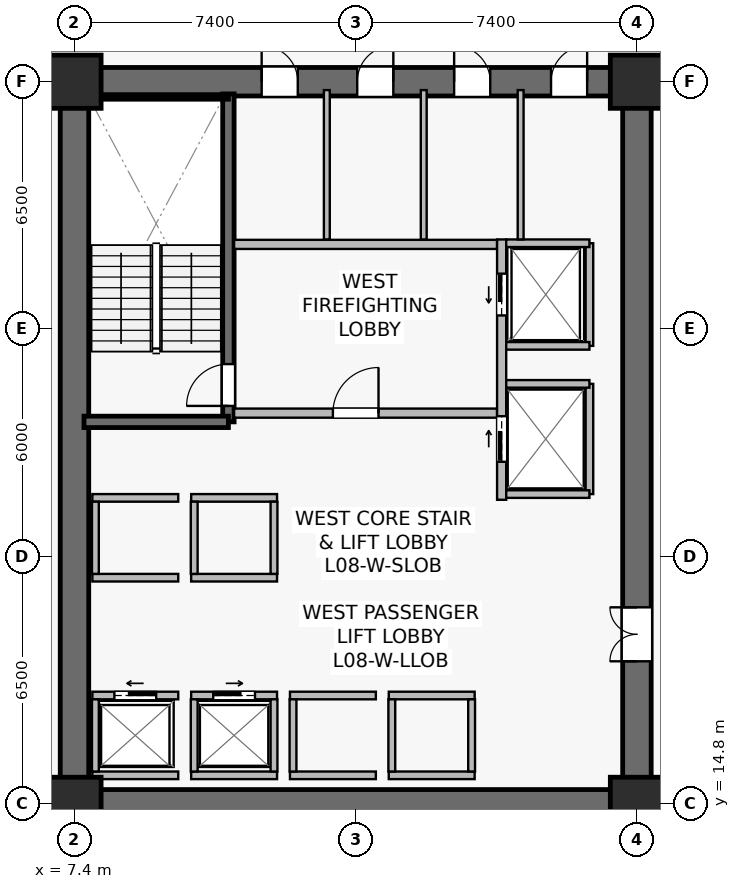
"""IFC4 building model, lengths in metres.
Left out: names, types, materials, properties, quantities, classifications, styles, units other than length and angle.
Written with IfcOpenShell. Run it as: python <this file> out.ifc"""

import sys

from ifc_helpers import new_model, si_unit, direction, frame, frame_2d, origin, origin_2d, place, context, subcontext, project, spatial, rectangle, extrude, source, transform, mapped, element, fill, save


model = new_model("IFC4")
c1 = context("Model", 3, precision=1e-05, world=origin(), true_north=direction((0.0, 1.0)))
c2 = subcontext(c1, "Body", "Model", "MODEL_VIEW")
j1 = project(units=[si_unit("LENGTHUNIT", "METRE"), si_unit("PLANEANGLEUNIT", "RADIAN")], contexts=[c1])
p1 = place(None, origin())
s1 = spatial("IfcSite", under=j1, at=p1, CompositionType="ELEMENT")
p2 = place(p1, origin())
s2 = spatial("IfcBuilding", under=s1, at=p2, CompositionType="ELEMENT")
p3 = place(p2, frame((0.0, 0.0, 33.4)))
s3 = spatial("IfcBuildingStorey", under=s2, at=p3, CompositionType="ELEMENT", Elevation=33.4)
p4 = place(p3, frame((7.025, 14.8, 0.0), z_axis=(0.0, 0.0, 1.0), x_axis=(1.0, 0.0, 0.0)))
e1 = element("IfcWall", 1, at=p4, inside=s3, PredefinedType="SHEAR", context=c2, shape_type="SweptSolid", body=[
    extrude(rectangle(XDim=15.55, YDim=0.75, at=frame_2d((7.775, 0.0))), origin(), (0.0, 0.0, 1.0), 3.78),
])
p5 = place(p3, frame((7.025, 33.8, 0.0), z_axis=(0.0, 0.0, 1.0), x_axis=(1.0, 0.0, 0.0)))
e2 = element("IfcWall", 2, at=p5, inside=s3, PredefinedType="SHEAR", context=c2, shape_type="SweptSolid", body=[
    extrude(rectangle(XDim=15.55, YDim=0.75, at=frame_2d((7.775, 0.0))), origin(), (0.0, 0.0, 1.0), 3.78),
])
p6 = place(p5, frame((5.3, 0.0, 0.0)))
e3 = element("IfcOpeningElement", 3, at=p6, cuts=e2, PredefinedType="OPENING", context=c2, shape_type="SweptSolid", body=[
    extrude(rectangle(XDim=0.95, YDim=2.15, at=frame_2d((0.475, 1.075))), frame((0.0, 0.385, 0.0), z_axis=(0.0, -1.0, 0.0), x_axis=(1.0, 0.0, 0.0)), (0.0, 0.0, 1.0), 0.77),
])
p7 = place(p5, frame((7.815, 0.0, 0.0)))
e4 = element("IfcOpeningElement", 4, at=p7, cuts=e2, PredefinedType="OPENING", context=c2, shape_type="SweptSolid", body=[
    extrude(rectangle(XDim=0.95, YDim=2.15, at=frame_2d((0.475, 1.075))), frame((0.0, 0.385, 0.0), z_axis=(0.0, -1.0, 0.0), x_axis=(1.0, 0.0, 0.0)), (0.0, 0.0, 1.0), 0.77),
])
p8 = place(p5, frame((10.365, 0.0, 0.0)))
e5 = element("IfcOpeningElement", 5, at=p8, cuts=e2, PredefinedType="OPENING", context=c2, shape_type="SweptSolid", body=[
    extrude(rectangle(XDim=0.95, YDim=2.15, at=frame_2d((0.475, 1.075))), frame((0.0, 0.385, 0.0), z_axis=(0.0, -1.0, 0.0), x_axis=(1.0, 0.0, 0.0)), (0.0, 0.0, 1.0), 0.77),
])
p9 = place(p5, frame((12.915, 0.0, 0.0)))
e6 = element("IfcOpeningElement", 6, at=p9, cuts=e2, PredefinedType="OPENING", context=c2, shape_type="SweptSolid", body=[
    extrude(rectangle(XDim=0.95, YDim=2.15, at=frame_2d((0.475, 1.075))), frame((0.0, 0.385, 0.0), z_axis=(0.0, -1.0, 0.0), x_axis=(1.0, 0.0, 0.0)), (0.0, 0.0, 1.0), 0.77),
])
p10 = place(p3, frame((7.4, 15.175, 0.0), z_axis=(0.0, 0.0, 1.0), x_axis=(0.0, 1.0, 0.0)))
e7 = element("IfcWall", 7, at=p10, inside=s3, PredefinedType="SHEAR", context=c2, shape_type="SweptSolid", body=[
    extrude(rectangle(XDim=18.25, YDim=0.75, at=frame_2d((9.125, 0.0))), origin(), (0.0, 0.0, 1.0), 3.78),
])
p11 = place(p3, frame((22.2, 15.175, 0.0), z_axis=(0.0, 0.0, 1.0), x_axis=(0.0, 1.0, 0.0)))
e8 = element("IfcWall", 8, at=p11, inside=s3, PredefinedType="SHEAR", context=c2, shape_type="SweptSolid", body=[
    extrude(rectangle(XDim=18.25, YDim=0.75, at=frame_2d((9.125, 0.0))), origin(), (0.0, 0.0, 1.0), 3.78),
])
p12 = place(p11, frame((3.375, 0.0, 0.0)))
e9 = element("IfcOpeningElement", 9, at=p12, cuts=e8, PredefinedType="OPENING", context=c2, shape_type="SweptSolid", body=[
    extrude(rectangle(XDim=1.42, YDim=2.2, at=frame_2d((0.71, 1.1))), frame((0.0, 0.385, 0.0), z_axis=(0.0, -1.0, 0.0), x_axis=(1.0, 0.0, 0.0)), (0.0, 0.0, 1.0), 0.77),
])
p13 = place(p3, frame((11.45, 24.85, 0.0), z_axis=(0.0, 0.0, 1.0), x_axis=(0.0, 1.0, 0.0)))
e10 = element("IfcWall", 10, at=p13, inside=s3, PredefinedType="SHEAR", context=c2, shape_type="SweptSolid", body=[
    extrude(rectangle(XDim=8.63, YDim=0.3, at=frame_2d((4.315, 0.0))), origin(), (0.0, 0.0, 1.0), 3.78),
])
p14 = place(p13, frame((0.42, 0.0, 0.0)))
e11 = element("IfcOpeningElement", 11, at=p14, cuts=e10, PredefinedType="OPENING", context=c2, shape_type="SweptSolid", body=[
    extrude(rectangle(XDim=1.1, YDim=2.15, at=frame_2d((0.55, 1.075))), frame((0.0, 0.16, 0.0), z_axis=(0.0, -1.0, 0.0), x_axis=(1.0, 0.0, 0.0)), (0.0, 0.0, 1.0), 0.32),
])
p15 = place(p3, frame((7.65, 24.85, 0.0), z_axis=(0.0, 0.0, 1.0), x_axis=(1.0, 0.0, 0.0)))
e12 = element("IfcWall", 12, at=p15, inside=s3, PredefinedType="SHEAR", context=c2, shape_type="SweptSolid", body=[
    extrude(rectangle(XDim=3.8, YDim=0.3, at=frame_2d((1.9, 0.0))), origin(), (0.0, 0.0, 1.0), 3.78),
])
p16 = place(p3, frame((7.73, 33.4, 0.0), z_axis=(0.0, 0.0, 1.0), x_axis=(1.0, 0.0, 0.0)))
e13 = element("IfcWall", 13, at=p16, inside=s3, PredefinedType="SOLIDWALL", context=c2, shape_type="SweptSolid", body=[
    extrude(rectangle(XDim=3.72, YDim=0.12, at=frame_2d((1.86, 0.0))), origin(), (0.0, 0.0, 1.0), 3.78),
])
m1 = source(origin(), c2, "Body", "SweptSolid", [
    extrude(rectangle(XDim=1.4, YDim=1.4, at=origin_2d()), origin(), (0.0, 0.0, 1.0), 4.1),
])
for number, where, z_axis, x_axis in (
    (14, (7.4, 14.8, 0.0), (0.0, 0.0, 1.0), (1.0, 0.0, 0.0)),
    (15, (22.2, 14.8, 0.0), (0.0, 0.0, 1.0), (1.0, 0.0, 0.0)),
    (16, (7.4, 33.8, 0.0), (0.0, 0.0, 1.0), (1.0, 0.0, 0.0)),
    (17, (22.2, 33.8, 0.0), (0.0, 0.0, 1.0), (1.0, 0.0, 0.0)),
):
    element("IfcColumn", number, at=place(p3, frame(where, z_axis=z_axis, x_axis=x_axis)), inside=s3, PredefinedType="COLUMN", context=c2, shape_type="MappedRepresentation", body=[
        mapped(m1, transform((0.0, 0.0, 0.0), scale=1.0)),
    ])
p17 = place(p3, frame((11.6, 25.08, 0.0), z_axis=(0.0, 0.0, 1.0), x_axis=(1.0, 0.0, 0.0)))
e18 = element("IfcWall", 18, at=p17, inside=s3, PredefinedType="SOLIDWALL", context=c2, shape_type="SweptSolid", body=[
    extrude(rectangle(XDim=6.92, YDim=0.24, at=frame_2d((3.46, 0.0))), origin(), (0.0, 0.0, 1.0), 3.065),
])
p18 = place(p17, frame((2.6, 0.0, 0.0)))
e19 = element("IfcOpeningElement", 19, at=p18, cuts=e18, PredefinedType="OPENING", context=c2, shape_type="SweptSolid", body=[
    extrude(rectangle(XDim=1.2, YDim=2.16, at=frame_2d((0.6, 1.08))), frame((0.0, 0.13, 0.0), z_axis=(0.0, -1.0, 0.0), x_axis=(1.0, 0.0, 0.0)), (0.0, 0.0, 1.0), 0.26),
])
p19 = place(p3, frame((11.6, 29.52, 0.0), z_axis=(0.0, 0.0, 1.0), x_axis=(1.0, 0.0, 0.0)))
e20 = element("IfcWall", 20, at=p19, inside=s3, PredefinedType="SOLIDWALL", context=c2, shape_type="SweptSolid", body=[
    extrude(rectangle(XDim=6.92, YDim=0.24, at=frame_2d((3.46, 0.0))), origin(), (0.0, 0.0, 1.0), 3.065),
])
p20 = place(p3, frame((18.64, 22.8, 0.0), z_axis=(0.0, 0.0, 1.0), x_axis=(0.0, 1.0, 0.0)))
e21 = element("IfcWall", 21, at=p20, inside=s3, PredefinedType="SOLIDWALL", context=c2, shape_type="SweptSolid", body=[
    extrude(rectangle(XDim=6.85, YDim=0.24, at=frame_2d((3.425, 0.0))), origin(), (0.0, 0.0, 1.0), 2.865),
])
p21 = place(p20, frame((4.85, 0.0, 0.0)))
e22 = element("IfcOpeningElement", 22, at=p21, cuts=e21, PredefinedType="OPENING", context=c2, shape_type="SweptSolid", body=[
    extrude(rectangle(XDim=1.1, YDim=2.22, at=frame_2d((0.55, 1.11))), frame((0.0, 0.13, 0.0), z_axis=(0.0, -1.0, 0.0), x_axis=(1.0, 0.0, 0.0)), (0.0, 0.0, 1.0), 0.26),
])
p22 = place(p20, frame((1.0, 0.0, 0.0)))
e23 = element("IfcOpeningElement", 23, at=p22, cuts=e21, PredefinedType="OPENING", context=c2, shape_type="SweptSolid", body=[
    extrude(rectangle(XDim=1.2, YDim=2.22, at=frame_2d((0.6, 1.11))), frame((0.0, 0.13, 0.0), z_axis=(0.0, -1.0, 0.0), x_axis=(1.0, 0.0, 0.0)), (0.0, 0.0, 1.0), 0.26),
])
p23 = place(p3, frame((7.87, 17.65, 0.0), z_axis=(0.0, 0.0, 1.0), x_axis=(1.0, 0.0, 0.0)))
e24 = element("IfcWall", 24, at=p23, inside=s3, PredefinedType="SOLIDWALL", context=c2, shape_type="SweptSolid", body=[
    extrude(rectangle(XDim=2.26, YDim=0.2, at=frame_2d((1.13, 0.0))), origin(), (0.0, 0.0, 1.0), 3.78),
])
p24 = place(p23, frame((0.58, 0.0, 0.0)))
e25 = element("IfcOpeningElement", 25, at=p24, cuts=e24, PredefinedType="OPENING", context=c2, shape_type="SweptSolid", body=[
    extrude(rectangle(XDim=1.1, YDim=2.22, at=frame_2d((0.55, 1.11))), frame((0.0, 0.11, 0.0), z_axis=(0.0, -1.0, 0.0), x_axis=(1.0, 0.0, 0.0)), (0.0, 0.0, 1.0), 0.22),
])
p25 = place(p3, frame((7.87, 15.55, 0.0), z_axis=(0.0, 0.0, 1.0), x_axis=(1.0, 0.0, 0.0)))
e26 = element("IfcWall", 26, at=p25, inside=s3, PredefinedType="SOLIDWALL", context=c2, shape_type="SweptSolid", body=[
    extrude(rectangle(XDim=2.26, YDim=0.2, at=frame_2d((1.13, 0.0))), origin(), (0.0, 0.0, 1.0), 3.78),
])
p26 = place(p3, frame((7.95, 15.65, 0.0), z_axis=(0.0, 0.0, 1.0), x_axis=(0.0, 1.0, 0.0)))
e27 = element("IfcWall", 27, at=p26, inside=s3, PredefinedType="SOLIDWALL", context=c2, shape_type="SweptSolid", body=[
    extrude(rectangle(XDim=1.9, YDim=0.18, at=frame_2d((0.95, 0.0))), origin(), (0.0, 0.0, 1.0), 3.78),
])
p27 = place(p3, frame((10.47, 17.65, 0.0), z_axis=(0.0, 0.0, 1.0), x_axis=(1.0, 0.0, 0.0)))
e28 = element("IfcWall", 28, at=p27, inside=s3, PredefinedType="SOLIDWALL", context=c2, shape_type="SweptSolid", body=[
    extrude(rectangle(XDim=2.26, YDim=0.2, at=frame_2d((1.13, 0.0))), origin(), (0.0, 0.0, 1.0), 3.78),
])
p28 = place(p27, frame((0.58, 0.0, 0.0)))
e29 = element("IfcOpeningElement", 29, at=p28, cuts=e28, PredefinedType="OPENING", context=c2, shape_type="SweptSolid", body=[
    extrude(rectangle(XDim=1.1, YDim=2.22, at=frame_2d((0.55, 1.11))), frame((0.0, 0.11, 0.0), z_axis=(0.0, -1.0, 0.0), x_axis=(1.0, 0.0, 0.0)), (0.0, 0.0, 1.0), 0.22),
])
p29 = place(p3, frame((10.47, 15.55, 0.0), z_axis=(0.0, 0.0, 1.0), x_axis=(1.0, 0.0, 0.0)))
e30 = element("IfcWall", 30, at=p29, inside=s3, PredefinedType="SOLIDWALL", context=c2, shape_type="SweptSolid", body=[
    extrude(rectangle(XDim=2.26, YDim=0.2, at=frame_2d((1.13, 0.0))), origin(), (0.0, 0.0, 1.0), 3.78),
])
for number, where, z_axis, x_axis in (
    (31, (10.55, 15.65, 0.0), (0.0, 0.0, 1.0), (0.0, 1.0, 0.0)),
    (32, (12.65, 15.65, 0.0), (0.0, 0.0, 1.0), (0.0, 1.0, 0.0)),
):
    element("IfcWall", number, at=place(p3, frame(where, z_axis=z_axis, x_axis=x_axis)), inside=s3, PredefinedType="SOLIDWALL", context=c2, shape_type="SweptSolid", body=[
        extrude(rectangle(XDim=1.9, YDim=0.18, at=frame_2d((0.95, 0.0))), origin(), (0.0, 0.0, 1.0), 3.78),
    ])
for number, where, z_axis, x_axis in (
    (33, (13.07, 17.65, 0.0), (0.0, 0.0, 1.0), (1.0, 0.0, 0.0)),
    (34, (13.07, 15.55, 0.0), (0.0, 0.0, 1.0), (1.0, 0.0, 0.0)),
):
    element("IfcWall", number, at=place(p3, frame(where, z_axis=z_axis, x_axis=x_axis)), inside=s3, PredefinedType="SOLIDWALL", context=c2, shape_type="SweptSolid", body=[
        extrude(rectangle(XDim=2.26, YDim=0.2, at=frame_2d((1.13, 0.0))), origin(), (0.0, 0.0, 1.0), 3.065),
    ])
p30 = place(p3, frame((13.15, 15.65, 0.0), z_axis=(0.0, 0.0, 1.0), x_axis=(0.0, 1.0, 0.0)))
e35 = element("IfcWall", 35, at=p30, inside=s3, PredefinedType="SOLIDWALL", context=c2, shape_type="SweptSolid", body=[
    extrude(rectangle(XDim=1.9, YDim=0.18, at=frame_2d((0.95, 0.0))), origin(), (0.0, 0.0, 1.0), 3.78),
])
for number, where, z_axis, x_axis in (
    (36, (15.67, 17.65, 0.0), (0.0, 0.0, 1.0), (1.0, 0.0, 0.0)),
    (37, (15.67, 15.55, 0.0), (0.0, 0.0, 1.0), (1.0, 0.0, 0.0)),
):
    element("IfcWall", number, at=place(p3, frame(where, z_axis=z_axis, x_axis=x_axis)), inside=s3, PredefinedType="SOLIDWALL", context=c2, shape_type="SweptSolid", body=[
        extrude(rectangle(XDim=2.26, YDim=0.2, at=frame_2d((1.13, 0.0))), origin(), (0.0, 0.0, 1.0), 3.78),
    ])
for number, where, z_axis, x_axis in (
    (38, (15.75, 15.65, 0.0), (0.0, 0.0, 1.0), (0.0, 1.0, 0.0)),
    (39, (17.85, 15.65, 0.0), (0.0, 0.0, 1.0), (0.0, 1.0, 0.0)),
):
    element("IfcWall", number, at=place(p3, frame(where, z_axis=z_axis, x_axis=x_axis)), inside=s3, PredefinedType="SOLIDWALL", context=c2, shape_type="SweptSolid", body=[
        extrude(rectangle(XDim=1.9, YDim=0.18, at=frame_2d((0.95, 0.0))), origin(), (0.0, 0.0, 1.0), 3.78),
    ])
for number, where, z_axis, x_axis in (
    (40, (7.87, 20.75, 0.0), (0.0, 0.0, 1.0), (1.0, 0.0, 0.0)),
    (41, (7.87, 22.85, 0.0), (0.0, 0.0, 1.0), (1.0, 0.0, 0.0)),
):
    element("IfcWall", number, at=place(p3, frame(where, z_axis=z_axis, x_axis=x_axis)), inside=s3, PredefinedType="SOLIDWALL", context=c2, shape_type="SweptSolid", body=[
        extrude(rectangle(XDim=2.26, YDim=0.2, at=frame_2d((1.13, 0.0))), origin(), (0.0, 0.0, 1.0), 3.78),
    ])
p31 = place(p3, frame((7.95, 20.85, 0.0), z_axis=(0.0, 0.0, 1.0), x_axis=(0.0, 1.0, 0.0)))
e42 = element("IfcWall", 42, at=p31, inside=s3, PredefinedType="SOLIDWALL", context=c2, shape_type="SweptSolid", body=[
    extrude(rectangle(XDim=1.9, YDim=0.18, at=frame_2d((0.95, 0.0))), origin(), (0.0, 0.0, 1.0), 3.78),
])
for number, where, z_axis, x_axis in (
    (43, (10.47, 20.75, 0.0), (0.0, 0.0, 1.0), (1.0, 0.0, 0.0)),
    (44, (10.47, 22.85, 0.0), (0.0, 0.0, 1.0), (1.0, 0.0, 0.0)),
):
    element("IfcWall", number, at=place(p3, frame(where, z_axis=z_axis, x_axis=x_axis)), inside=s3, PredefinedType="SOLIDWALL", context=c2, shape_type="SweptSolid", body=[
        extrude(rectangle(XDim=2.26, YDim=0.2, at=frame_2d((1.13, 0.0))), origin(), (0.0, 0.0, 1.0), 3.78),
    ])
for number, where, z_axis, x_axis in (
    (45, (10.55, 20.85, 0.0), (0.0, 0.0, 1.0), (0.0, 1.0, 0.0)),
    (46, (12.65, 20.85, 0.0), (0.0, 0.0, 1.0), (0.0, 1.0, 0.0)),
):
    element("IfcWall", number, at=place(p3, frame(where, z_axis=z_axis, x_axis=x_axis)), inside=s3, PredefinedType="SOLIDWALL", context=c2, shape_type="SweptSolid", body=[
        extrude(rectangle(XDim=1.9, YDim=0.18, at=frame_2d((0.95, 0.0))), origin(), (0.0, 0.0, 1.0), 3.78),
    ])
p32 = place(p3, frame((20.95, 26.85, 0.0), z_axis=(0.0, 0.0, 1.0), x_axis=(0.0, 1.0, 0.0)))
e47 = element("IfcWall", 47, at=p32, inside=s3, PredefinedType="SOLIDWALL", context=c2, shape_type="SweptSolid", body=[
    extrude(rectangle(XDim=2.7, YDim=0.2, at=frame_2d((1.35, 0.0))), origin(), (0.0, 0.0, 1.0), 3.78),
])
p33 = place(p3, frame((18.76, 29.55, 0.0), z_axis=(0.0, 0.0, 1.0), x_axis=(1.0, 0.0, 0.0)))
e48 = element("IfcWall", 48, at=p33, inside=s3, PredefinedType="SOLIDWALL", context=c2, shape_type="SweptSolid", body=[
    extrude(rectangle(XDim=2.19, YDim=0.2, at=frame_2d((1.095, 0.0))), origin(), (0.0, 0.0, 1.0), 3.78),
])
p34 = place(p3, frame((18.76, 26.85, 0.0), z_axis=(0.0, 0.0, 1.0), x_axis=(1.0, 0.0, 0.0)))
e49 = element("IfcWall", 49, at=p34, inside=s3, PredefinedType="SOLIDWALL", context=c2, shape_type="SweptSolid", body=[
    extrude(rectangle(XDim=2.19, YDim=0.2, at=frame_2d((1.095, 0.0))), origin(), (0.0, 0.0, 1.0), 3.177),
])
p35 = place(p3, frame((20.95, 22.95, 0.0), z_axis=(0.0, 0.0, 1.0), x_axis=(0.0, 1.0, 0.0)))
e50 = element("IfcWall", 50, at=p35, inside=s3, PredefinedType="SOLIDWALL", context=c2, shape_type="SweptSolid", body=[
    extrude(rectangle(XDim=2.9, YDim=0.2, at=frame_2d((1.45, 0.0))), origin(), (0.0, 0.0, 1.0), 2.865),
])
for number, where, z_axis, x_axis in (
    (51, (18.76, 25.85, 0.0), (0.0, 0.0, 1.0), (1.0, 0.0, 0.0)),
    (52, (18.76, 22.95, 0.0), (0.0, 0.0, 1.0), (1.0, 0.0, 0.0)),
):
    element("IfcWall", number, at=place(p3, frame(where, z_axis=z_axis, x_axis=x_axis)), inside=s3, PredefinedType="SOLIDWALL", context=c2, shape_type="SweptSolid", body=[
        extrude(rectangle(XDim=2.19, YDim=0.2, at=frame_2d((1.095, 0.0))), origin(), (0.0, 0.0, 1.0), 3.78),
    ])
for number, where, z_axis, x_axis in (
    (53, (14.04, 29.65, 0.0), (0.0, 0.0, 1.0), (0.0, 1.0, 0.0)),
    (54, (16.59, 29.65, 0.0), (0.0, 0.0, 1.0), (0.0, 1.0, 0.0)),
    (55, (19.14, 29.65, 0.0), (0.0, 0.0, 1.0), (0.0, 1.0, 0.0)),
):
    element("IfcWall", number, at=place(p3, frame(where, z_axis=z_axis, x_axis=x_axis)), inside=s3, PredefinedType="PLUMBINGWALL", context=c2, shape_type="SweptSolid", body=[
        extrude(rectangle(XDim=3.93, YDim=0.155, at=frame_2d((1.965, 0.0))), origin(), (0.0, 0.0, 1.0), 3.78),
    ])
m2 = source(origin(), c2, "Body", "SweptSolid", [
    extrude(rectangle(XDim=1.1, YDim=2.15, at=frame_2d((0.55, 1.075))), frame((0.0, 0.025, 0.0), z_axis=(0.0, -1.0, 0.0), x_axis=(1.0, 0.0, 0.0)), (0.0, 0.0, 1.0), 0.05),
])
p36 = place(p14, origin())
e56 = element("IfcDoor", 56, at=p36, inside=s3, OperationType="SINGLE_SWING_LEFT", PredefinedType="DOOR", context=c2, shape_type="MappedRepresentation", body=[
    mapped(m2, transform((0.0, 0.0, 0.0), scale=1.0)),
])
fill(e11, e56)
m3 = source(origin(), c2, "Body", "SweptSolid", [
    extrude(rectangle(XDim=1.2, YDim=2.16, at=frame_2d((0.6, 1.08))), frame((0.0, 0.025, 0.0), z_axis=(0.0, -1.0, 0.0), x_axis=(1.0, 0.0, 0.0)), (0.0, 0.0, 1.0), 0.05),
])
p37 = place(p18, origin())
e57 = element("IfcDoor", 57, at=p37, inside=s3, OperationType="SINGLE_SWING_RIGHT", PredefinedType="DOOR", context=c2, shape_type="MappedRepresentation", body=[
    mapped(m3, transform((0.0, 0.0, 0.0), scale=1.0)),
])
fill(e19, e57)
m4 = source(origin(), c2, "Body", "SweptSolid", [
    extrude(rectangle(XDim=1.1, YDim=2.22, at=frame_2d((0.55, 1.11))), frame((0.0, 0.025, 0.0), z_axis=(0.0, -1.0, 0.0), x_axis=(1.0, 0.0, 0.0)), (0.0, 0.0, 1.0), 0.05),
])
p38 = place(p24, origin())
e58 = element("IfcDoor", 58, at=p38, inside=s3, OperationType="SLIDING_TO_LEFT", PredefinedType="USERDEFINED", context=c2, shape_type="MappedRepresentation", body=[
    mapped(m4, transform((0.0, 0.0, 0.0), scale=1.0)),
])
fill(e25, e58)
p39 = place(p28, origin())
e59 = element("IfcDoor", 59, at=p39, inside=s3, OperationType="SLIDING_TO_RIGHT", PredefinedType="USERDEFINED", context=c2, shape_type="MappedRepresentation", body=[
    mapped(m4, transform((0.0, 0.0, 0.0), scale=1.0)),
])
fill(e29, e59)
p40 = place(p21, origin())
e60 = element("IfcDoor", 60, at=p40, inside=s3, OperationType="SLIDING_TO_LEFT", PredefinedType="USERDEFINED", context=c2, shape_type="MappedRepresentation", body=[
    mapped(m4, transform((0.0, 0.0, 0.0), scale=1.0)),
])
fill(e22, e60)
m5 = source(origin(), c2, "Body", "SweptSolid", [
    extrude(rectangle(XDim=1.2, YDim=2.22, at=frame_2d((0.6, 1.11))), frame((0.0, 0.025, 0.0), z_axis=(0.0, -1.0, 0.0), x_axis=(1.0, 0.0, 0.0)), (0.0, 0.0, 1.0), 0.05),
])
p41 = place(p22, origin())
e61 = element("IfcDoor", 61, at=p41, inside=s3, OperationType="SLIDING_TO_RIGHT", PredefinedType="USERDEFINED", context=c2, shape_type="MappedRepresentation", body=[
    mapped(m5, transform((0.0, 0.0, 0.0), scale=1.0)),
])
fill(e23, e61)
m6 = source(origin(), c2, "Body", "SweptSolid", [
    extrude(rectangle(XDim=1.42, YDim=2.2, at=frame_2d((0.71, 1.1))), frame((0.0, 0.025, 0.0), z_axis=(0.0, -1.0, 0.0), x_axis=(1.0, 0.0, 0.0)), (0.0, 0.0, 1.0), 0.05),
])
p42 = place(p12, origin())
e62 = element("IfcDoor", 62, at=p42, inside=s3, OperationType="DOUBLE_DOOR_SINGLE_SWING", PredefinedType="DOOR", context=c2, shape_type="MappedRepresentation", body=[
    mapped(m6, transform((0.0, 0.0, 0.0), scale=1.0)),
])
fill(e9, e62)
m7 = source(origin(), c2, "Body", "SweptSolid", [
    extrude(rectangle(XDim=0.95, YDim=2.15, at=frame_2d((0.475, 1.075))), frame((0.0, 0.025, 0.0), z_axis=(0.0, -1.0, 0.0), x_axis=(1.0, 0.0, 0.0)), (0.0, 0.0, 1.0), 0.05),
])
p43 = place(p6, origin())
e63 = element("IfcDoor", 63, at=p43, inside=s3, OperationType="SINGLE_SWING_LEFT", PredefinedType="DOOR", context=c2, shape_type="MappedRepresentation", body=[
    mapped(m7, transform((0.0, 0.0, 0.0), scale=1.0)),
])
fill(e3, e63)
p44 = place(p7, origin())
e64 = element("IfcDoor", 64, at=p44, inside=s3, OperationType="SINGLE_SWING_RIGHT", PredefinedType="DOOR", context=c2, shape_type="MappedRepresentation", body=[
    mapped(m7, transform((0.0, 0.0, 0.0), scale=1.0)),
])
fill(e4, e64)
p45 = place(p8, origin())
e65 = element("IfcDoor", 65, at=p45, inside=s3, OperationType="SINGLE_SWING_LEFT", PredefinedType="DOOR", context=c2, shape_type="MappedRepresentation", body=[
    mapped(m7, transform((0.0, 0.0, 0.0), scale=1.0)),
])
fill(e5, e65)
p46 = place(p9, origin())
e66 = element("IfcDoor", 66, at=p46, inside=s3, OperationType="SINGLE_SWING_RIGHT", PredefinedType="DOOR", context=c2, shape_type="MappedRepresentation", body=[
    mapped(m7, transform((0.0, 0.0, 0.0), scale=1.0)),
])
fill(e6, e66)
save(model, sys.argv[1])
